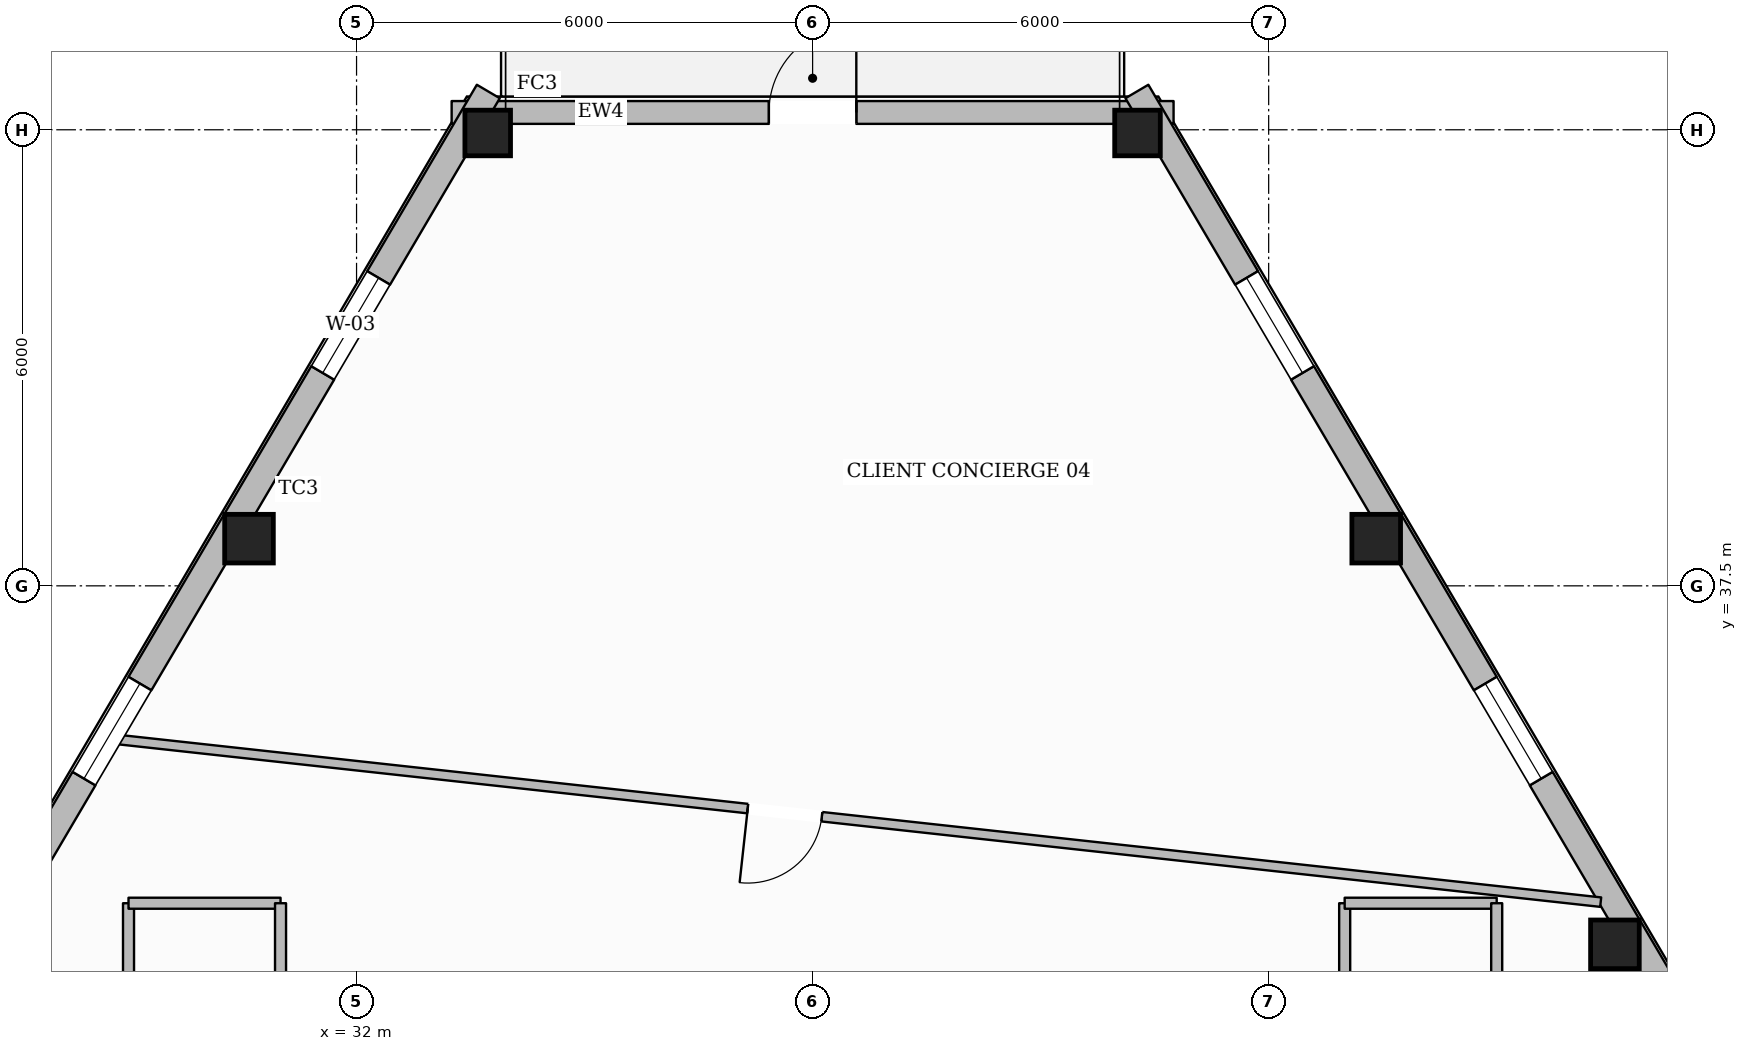
"""IFC4 building model, lengths in metres.
Left out: names, types, materials, properties, quantities, classifications, styles, units other than length and angle.
Written with IfcOpenShell. Run it as: python <this file> out.ifc"""

import sys

from ifc_helpers import new_model, si_unit, direction, frame, frame_2d, origin, origin_2d, place, context, subcontext, project, spatial, rectangle, hollow_rectangle, extrude, element, fill, save


model = new_model("IFC4")
c1 = context("Model", 3, precision=1e-05, world=origin(), true_north=direction((0.0, 1.0)))
c2 = subcontext(c1, "Body", "Model", "MODEL_VIEW")
j1 = project(units=[si_unit("LENGTHUNIT", "METRE"), si_unit("PLANEANGLEUNIT", "RADIAN")], contexts=[c1])
p1 = place(None, origin())
s1 = spatial("IfcSite", under=j1, at=p1, CompositionType="ELEMENT")
p2 = place(p1, origin())
s2 = spatial("IfcBuilding", under=s1, at=p2, CompositionType="ELEMENT")
p3 = place(p2, frame((0.0, 0.0, 203.5)))
s3 = spatial("IfcBuildingStorey", under=s2, at=p3, CompositionType="ELEMENT", Elevation=203.5)
p4 = place(p3, frame((33.726, 43.458, 0.0), z_axis=(0.0, 0.0, 1.0), x_axis=(1.0, 0.0, 0.0)))
e1 = element("IfcColumn", 1, at=p4, inside=s3, PredefinedType="COLUMN", context=c2, shape_type="SweptSolid", body=[
    extrude(hollow_rectangle(XDim=0.6, YDim=0.6, WallThickness=0.028, at=origin_2d()), origin(), (0.0, 0.0, 1.0), 3.6),
])
for number, where, z_axis, x_axis in (
    (2, (30.585, 38.121, 0.0), (0.0, 0.0, 1.0), (1.0, 0.0, 0.0)),
    (3, (48.555, 32.784, 0.0), (0.0, 0.0, 1.0), (1.0, 0.0, 0.0)),
    (4, (45.415, 38.121, 0.0), (0.0, 0.0, 1.0), (1.0, 0.0, 0.0)),
):
    element("IfcColumn", number, at=place(p3, frame(where, z_axis=z_axis, x_axis=x_axis)), inside=s3, PredefinedType="COLUMN", context=c2, shape_type="SweptSolid", body=[
        extrude(hollow_rectangle(XDim=0.64, YDim=0.64, WallThickness=0.028, at=origin_2d()), origin(), (0.0, 0.0, 1.0), 3.6),
    ])
p5 = place(p3, frame((42.274, 43.458, 0.0), z_axis=(0.0, 0.0, 1.0), x_axis=(1.0, 0.0, 0.0)))
e5 = element("IfcColumn", 5, at=p5, inside=s3, PredefinedType="COLUMN", context=c2, shape_type="SweptSolid", body=[
    extrude(hollow_rectangle(XDim=0.6, YDim=0.6, WallThickness=0.028, at=origin_2d()), origin(), (0.0, 0.0, 1.0), 3.6),
])
p6 = place(p3, frame((33.251, 43.728, 0.0), z_axis=(0.0, 0.0, 1.0), x_axis=(1.0, 0.0, 0.0)))
e6 = element("IfcWall", 6, at=p6, inside=s3, PredefinedType="STANDARD", context=c2, shape_type="SweptSolid", body=[
    extrude(rectangle(XDim=9.498, YDim=0.3, at=frame_2d((4.749, 0.0))), origin(), (0.0, 0.0, 1.0), 3.132),
])
p7 = place(p6, frame((4.174, 0.0, 0.0)))
e7 = element("IfcOpeningElement", 7, at=p7, cuts=e6, PredefinedType="OPENING", context=c2, shape_type="SweptSolid", body=[
    extrude(rectangle(XDim=1.15, YDim=2.2, at=frame_2d((0.575, 1.1))), frame((0.0, 0.16, 0.0), z_axis=(0.0, -1.0, 0.0), x_axis=(1.0, 0.0, 0.0)), (0.0, 0.0, 1.0), 0.32),
])
p8 = place(p3, frame((14.405, 11.157, 0.0), z_axis=(0.0, 0.0, 1.0), x_axis=(0.507147779291, 0.861859112593, 0.0)))
e8 = element("IfcWall", 8, at=p8, inside=s3, PredefinedType="STANDARD", context=c2, shape_type="SweptSolid", body=[
    extrude(rectangle(XDim=38.111, YDim=0.35, at=frame_2d((19.056, 0.0))), origin(), (0.0, 0.0, 1.0), 3.132),
])
p9 = place(p8, frame((33.816, 0.0, 0.65)))
e9 = element("IfcOpeningElement", 9, at=p9, cuts=e8, PredefinedType="OPENING", context=c2, shape_type="SweptSolid", body=[
    extrude(rectangle(XDim=1.45, YDim=1.75, at=frame_2d((0.725, 0.875))), frame((0.0, 0.185, 0.0), z_axis=(0.0, -1.0, 0.0), x_axis=(1.0, 0.0, 0.0)), (0.0, 0.0, 1.0), 0.37),
])
p10 = place(p8, frame((27.623, 0.0, 0.65)))
e10 = element("IfcOpeningElement", 10, at=p10, cuts=e8, PredefinedType="OPENING", context=c2, shape_type="SweptSolid", body=[
    extrude(rectangle(XDim=1.45, YDim=1.75, at=frame_2d((0.725, 0.875))), frame((0.0, 0.185, 0.0), z_axis=(0.0, -1.0, 0.0), x_axis=(1.0, 0.0, 0.0)), (0.0, 0.0, 1.0), 0.37),
])
p11 = place(p8, frame((15.239, 0.0, 0.65)))
e11 = element("IfcOpeningElement", 11, at=p11, cuts=e8, PredefinedType="OPENING", context=c2, shape_type="SweptSolid", body=[
    extrude(rectangle(XDim=1.45, YDim=1.75, at=frame_2d((0.725, 0.875))), frame((0.0, 0.185, 0.0), z_axis=(0.0, -1.0, 0.0), x_axis=(1.0, 0.0, 0.0)), (0.0, 0.0, 1.0), 0.37),
])
p12 = place(p8, frame((9.046, 0.0, 0.65)))
e12 = element("IfcOpeningElement", 12, at=p12, cuts=e8, PredefinedType="OPENING", context=c2, shape_type="SweptSolid", body=[
    extrude(rectangle(XDim=1.45, YDim=1.75, at=frame_2d((0.725, 0.875))), frame((0.0, 0.185, 0.0), z_axis=(0.0, -1.0, 0.0), x_axis=(1.0, 0.0, 0.0)), (0.0, 0.0, 1.0), 0.37),
])
p13 = place(p8, frame((2.854, 0.0, 0.65)))
e13 = element("IfcOpeningElement", 13, at=p13, cuts=e8, PredefinedType="OPENING", context=c2, shape_type="SweptSolid", body=[
    extrude(rectangle(XDim=1.45, YDim=1.75, at=frame_2d((0.725, 0.875))), frame((0.0, 0.185, 0.0), z_axis=(0.0, -1.0, 0.0), x_axis=(1.0, 0.0, 0.0)), (0.0, 0.0, 1.0), 0.37),
])
p14 = place(p3, frame((42.267, 44.004, 0.0), z_axis=(0.0, 0.0, 1.0), x_axis=(0.507147779291, -0.861859112593, 0.0)))
e14 = element("IfcWall", 14, at=p14, inside=s3, PredefinedType="STANDARD", context=c2, shape_type="SweptSolid", body=[
    extrude(rectangle(XDim=38.111, YDim=0.35, at=frame_2d((19.056, 0.0))), origin(), (0.0, 0.0, 1.0), 3.132),
])
p15 = place(p14, frame((33.808, 0.0, 0.65)))
e15 = element("IfcOpeningElement", 15, at=p15, cuts=e14, PredefinedType="OPENING", context=c2, shape_type="SweptSolid", body=[
    extrude(rectangle(XDim=1.45, YDim=1.75, at=frame_2d((0.725, 0.875))), frame((0.0, 0.185, 0.0), z_axis=(0.0, -1.0, 0.0), x_axis=(1.0, 0.0, 0.0)), (0.0, 0.0, 1.0), 0.37),
])
p16 = place(p14, frame((27.615, 0.0, 0.65)))
e16 = element("IfcOpeningElement", 16, at=p16, cuts=e14, PredefinedType="OPENING", context=c2, shape_type="SweptSolid", body=[
    extrude(rectangle(XDim=1.45, YDim=1.75, at=frame_2d((0.725, 0.875))), frame((0.0, 0.185, 0.0), z_axis=(0.0, -1.0, 0.0), x_axis=(1.0, 0.0, 0.0)), (0.0, 0.0, 1.0), 0.37),
])
p17 = place(p14, frame((15.231, 0.0, 0.65)))
e17 = element("IfcOpeningElement", 17, at=p17, cuts=e14, PredefinedType="OPENING", context=c2, shape_type="SweptSolid", body=[
    extrude(rectangle(XDim=1.45, YDim=1.75, at=frame_2d((0.725, 0.875))), frame((0.0, 0.185, 0.0), z_axis=(0.0, -1.0, 0.0), x_axis=(1.0, 0.0, 0.0)), (0.0, 0.0, 1.0), 0.37),
])
p18 = place(p14, frame((9.038, 0.0, 0.65)))
e18 = element("IfcOpeningElement", 18, at=p18, cuts=e14, PredefinedType="OPENING", context=c2, shape_type="SweptSolid", body=[
    extrude(rectangle(XDim=1.45, YDim=1.75, at=frame_2d((0.725, 0.875))), frame((0.0, 0.185, 0.0), z_axis=(0.0, -1.0, 0.0), x_axis=(1.0, 0.0, 0.0)), (0.0, 0.0, 1.0), 0.37),
])
p19 = place(p14, frame((2.846, 0.0, 0.65)))
e19 = element("IfcOpeningElement", 19, at=p19, cuts=e14, PredefinedType="OPENING", context=c2, shape_type="SweptSolid", body=[
    extrude(rectangle(XDim=1.45, YDim=1.75, at=frame_2d((0.725, 0.875))), frame((0.0, 0.185, 0.0), z_axis=(0.0, -1.0, 0.0), x_axis=(1.0, 0.0, 0.0)), (0.0, 0.0, 1.0), 0.37),
])
p20 = place(p3, frame((29.0, 25.02, 0.0), z_axis=(0.0, 0.0, 1.0), x_axis=(0.0, 1.0, 0.0)))
e20 = element("IfcWall", 20, at=p20, inside=s3, PredefinedType="PARTITIONING", context=c2, shape_type="SweptSolid", body=[
    extrude(rectangle(XDim=8.304, YDim=0.145, at=frame_2d((4.152, 0.0))), origin(), (0.0, 0.0, 1.0), 3.6),
])
p21 = place(p3, frame((29.0, 33.324, 0.0), z_axis=(0.0, 0.0, 1.0), x_axis=(1.0, 0.0, 0.0)))
e21 = element("IfcWall", 21, at=p21, inside=s3, PredefinedType="PARTITIONING", context=c2, shape_type="SweptSolid", body=[
    extrude(rectangle(XDim=2.0, YDim=0.145, at=frame_2d((1.0, 0.0))), origin(), (0.0, 0.0, 1.0), 3.6),
])
p22 = place(p3, frame((31.0, 33.324, 0.0), z_axis=(0.0, 0.0, 1.0), x_axis=(0.0, -1.0, 0.0)))
e22 = element("IfcWall", 22, at=p22, inside=s3, PredefinedType="PARTITIONING", context=c2, shape_type="SweptSolid", body=[
    extrude(rectangle(XDim=8.304, YDim=0.145, at=frame_2d((4.152, 0.0))), origin(), (0.0, 0.0, 1.0), 3.6),
])
p23 = place(p3, frame((45.0, 25.02, 0.0), z_axis=(0.0, 0.0, 1.0), x_axis=(0.0, 1.0, 0.0)))
e23 = element("IfcWall", 23, at=p23, inside=s3, PredefinedType="PARTITIONING", context=c2, shape_type="SweptSolid", body=[
    extrude(rectangle(XDim=8.304, YDim=0.145, at=frame_2d((4.152, 0.0))), origin(), (0.0, 0.0, 1.0), 3.6),
])
p24 = place(p23, frame((3.452, 0.0, 0.0)))
e24 = element("IfcOpeningElement", 24, at=p24, cuts=e23, PredefinedType="OPENING", context=c2, shape_type="SweptSolid", body=[
    extrude(rectangle(XDim=1.4, YDim=2.2, at=frame_2d((0.7, 1.1))), frame((0.0, 0.083, 0.0), z_axis=(0.0, -1.0, 0.0), x_axis=(1.0, 0.0, 0.0)), (0.0, 0.0, 1.0), 0.165),
])
p25 = place(p3, frame((45.0, 33.324, 0.0), z_axis=(0.0, 0.0, 1.0), x_axis=(1.0, 0.0, 0.0)))
e25 = element("IfcWall", 25, at=p25, inside=s3, PredefinedType="PARTITIONING", context=c2, shape_type="SweptSolid", body=[
    extrude(rectangle(XDim=2.0, YDim=0.145, at=frame_2d((1.0, 0.0))), origin(), (0.0, 0.0, 1.0), 3.6),
])
p26 = place(p3, frame((47.0, 33.324, 0.0), z_axis=(0.0, 0.0, 1.0), x_axis=(0.0, -1.0, 0.0)))
e26 = element("IfcWall", 26, at=p26, inside=s3, PredefinedType="PARTITIONING", context=c2, shape_type="SweptSolid", body=[
    extrude(rectangle(XDim=8.304, YDim=0.145, at=frame_2d((4.152, 0.0))), origin(), (0.0, 0.0, 1.0), 3.6),
])
p27 = place(p3, frame((28.919, 30.452, 0.0), z_axis=(0.0, 0.0, 1.0), x_axis=(-0.53460118531, 0.845104474408, 0.0)))
e27 = element("IfcWall", 27, at=p27, inside=s3, PredefinedType="PARTITIONING", context=c2, shape_type="SweptSolid", body=[
    extrude(rectangle(XDim=2.371, YDim=0.125, at=frame_2d((1.185, 0.0))), origin(), (0.0, 0.0, 1.0), 3.6),
])
p28 = place(p3, frame((48.368, 33.339, 0.0), z_axis=(0.0, 0.0, 1.0), x_axis=(-0.994040131704, 0.109014753872, 0.0)))
e28 = element("IfcWall", 28, at=p28, inside=s3, PredefinedType="PARTITIONING", context=c2, shape_type="SweptSolid", body=[
    extrude(rectangle(XDim=19.596, YDim=0.125, at=frame_2d((9.798, 0.0))), origin(), (0.0, 0.0, 1.0), 3.6),
])
p29 = place(p28, frame((10.309, 0.0, 0.0)))
e29 = element("IfcOpeningElement", 29, at=p29, cuts=e28, PredefinedType="OPENING", context=c2, shape_type="SweptSolid", body=[
    extrude(rectangle(XDim=0.98, YDim=2.15, at=frame_2d((0.49, 1.075))), frame((0.0, 0.073, 0.0), z_axis=(0.0, -1.0, 0.0), x_axis=(1.0, 0.0, 0.0)), (0.0, 0.0, 1.0), 0.145),
])
p30 = place(p7, origin())
e30 = element("IfcDoor", 30, at=p30, inside=s3, OperationType="SINGLE_SWING_RIGHT", PredefinedType="DOOR", context=c2, shape_type="SweptSolid", body=[
    extrude(rectangle(XDim=1.15, YDim=2.2, at=frame_2d((0.575, 1.1))), frame((0.0, 0.025, 0.0), z_axis=(0.0, -1.0, 0.0), x_axis=(1.0, 0.0, 0.0)), (0.0, 0.0, 1.0), 0.05),
])
fill(e7, e30)
p31 = place(p9, origin())
e31 = element("IfcWindow", 31, at=p31, inside=s3, PartitioningType="SINGLE_PANEL", PredefinedType="WINDOW", context=c2, shape_type="SweptSolid", body=[
    extrude(rectangle(XDim=1.45, YDim=1.75, at=frame_2d((0.725, 0.875))), frame((0.0, 0.03, 0.0), z_axis=(0.0, -1.0, 0.0), x_axis=(1.0, 0.0, 0.0)), (0.0, 0.0, 1.0), 0.06),
])
fill(e9, e31)
p32 = place(p10, origin())
e32 = element("IfcWindow", 32, at=p32, inside=s3, PartitioningType="SINGLE_PANEL", PredefinedType="WINDOW", context=c2, shape_type="SweptSolid", body=[
    extrude(rectangle(XDim=1.45, YDim=1.75, at=frame_2d((0.725, 0.875))), frame((0.0, 0.03, 0.0), z_axis=(0.0, -1.0, 0.0), x_axis=(1.0, 0.0, 0.0)), (0.0, 0.0, 1.0), 0.06),
])
fill(e10, e32)
p33 = place(p18, origin())
e33 = element("IfcWindow", 33, at=p33, inside=s3, PartitioningType="SINGLE_PANEL", PredefinedType="WINDOW", context=c2, shape_type="SweptSolid", body=[
    extrude(rectangle(XDim=1.45, YDim=1.75, at=frame_2d((0.725, 0.875))), frame((0.0, 0.03, 0.0), z_axis=(0.0, -1.0, 0.0), x_axis=(1.0, 0.0, 0.0)), (0.0, 0.0, 1.0), 0.06),
])
fill(e18, e33)
p34 = place(p19, origin())
e34 = element("IfcWindow", 34, at=p34, inside=s3, PartitioningType="SINGLE_PANEL", PredefinedType="WINDOW", context=c2, shape_type="SweptSolid", body=[
    extrude(rectangle(XDim=1.45, YDim=1.75, at=frame_2d((0.725, 0.875))), frame((0.0, 0.03, 0.0), z_axis=(0.0, -1.0, 0.0), x_axis=(1.0, 0.0, 0.0)), (0.0, 0.0, 1.0), 0.06),
])
fill(e19, e34)
p35 = place(p29, origin())
e35 = element("IfcDoor", 35, at=p35, inside=s3, OperationType="SINGLE_SWING_RIGHT", PredefinedType="DOOR", context=c2, shape_type="SweptSolid", body=[
    extrude(rectangle(XDim=0.98, YDim=2.15, at=frame_2d((0.49, 1.075))), frame((0.0, 0.025, 0.0), z_axis=(0.0, -1.0, 0.0), x_axis=(1.0, 0.0, 0.0)), (0.0, 0.0, 1.0), 0.05),
])
fill(e29, e35)
save(model, sys.argv[1])
